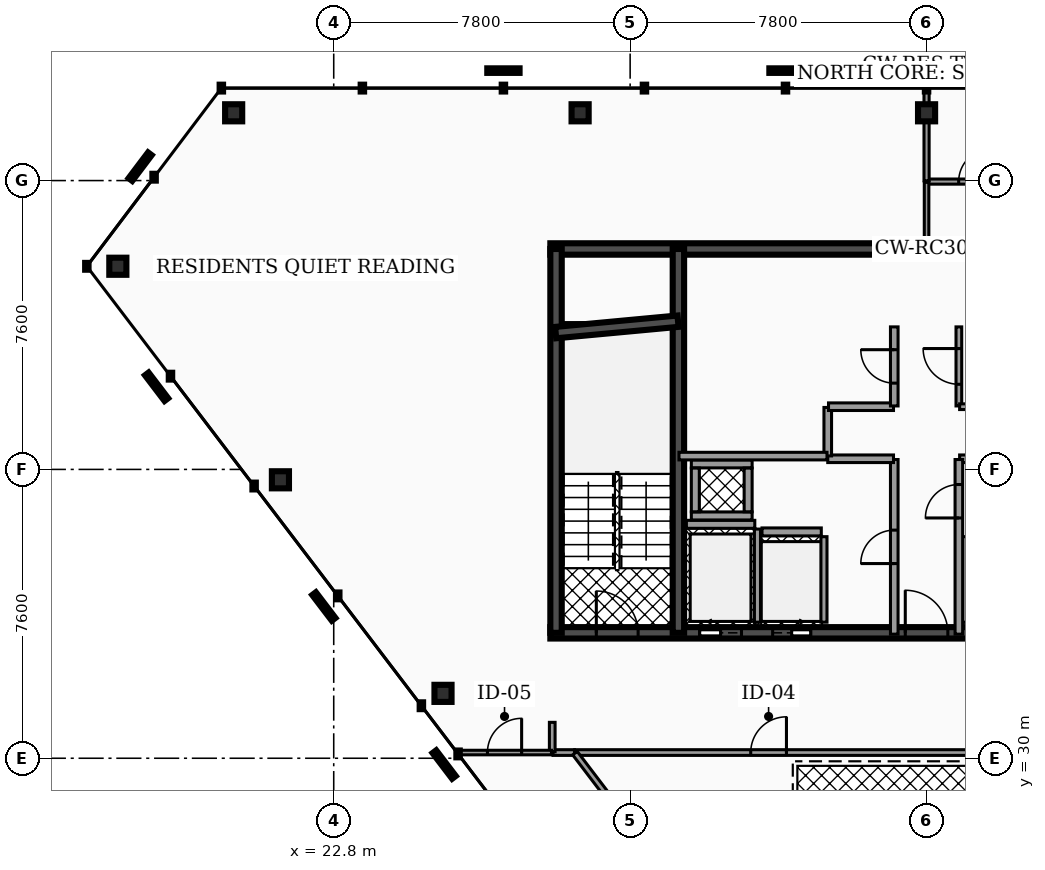
"""IFC4 building model, lengths in metres.
Left out: names, types, materials, properties, quantities, classifications, styles, units other than length and angle.
Written with IfcOpenShell. Run it as: python <this file> out.ifc"""

import sys

from ifc_helpers import new_model, si_unit, direction, frame, frame_2d, origin, origin_2d, place, context, subcontext, project, spatial, rectangle, hollow_rectangle, extrude, element, fill, save


model = new_model("IFC4")
c1 = context("Model", 3, precision=1e-05, world=origin(), true_north=direction((0.0, 1.0)))
c2 = subcontext(c1, "Body", "Model", "MODEL_VIEW")
j1 = project(units=[si_unit("LENGTHUNIT", "METRE"), si_unit("PLANEANGLEUNIT", "RADIAN")], contexts=[c1])
p1 = place(None, origin())
s1 = spatial("IfcSite", under=j1, at=p1, CompositionType="ELEMENT")
p2 = place(p1, origin())
s2 = spatial("IfcBuilding", under=s1, at=p2, CompositionType="ELEMENT")
p3 = place(p2, frame((0.0, 0.0, 285.6)))
s3 = spatial("IfcBuildingStorey", under=s2, at=p3, CompositionType="ELEMENT", Elevation=285.6)
p4 = place(p3, frame((28.5, 43.4, 0.0), z_axis=(0.0, 0.0, 1.0), x_axis=(1.0, 0.0, 0.0)))
e1 = element("IfcWall", 1, at=p4, inside=s3, PredefinedType="SHEAR", context=c2, shape_type="SweptSolid", body=[
    extrude(rectangle(XDim=19.86, YDim=0.3, at=frame_2d((9.93, 0.0))), origin(), (0.0, 0.0, 1.0), 3.18),
])
p5 = place(p3, frame((28.5, 33.3, 0.0), z_axis=(0.0, 0.0, 1.0), x_axis=(1.0, 0.0, 0.0)))
e2 = element("IfcWall", 2, at=p5, inside=s3, PredefinedType="SHEAR", context=c2, shape_type="SweptSolid", body=[
    extrude(rectangle(XDim=19.86, YDim=0.3, at=frame_2d((9.93, 0.0))), origin(), (0.0, 0.0, 1.0), 3.18),
])
p6 = place(p5, frame((3.93, 0.0, 0.0)))
e3 = element("IfcOpeningElement", 3, at=p6, cuts=e2, PredefinedType="OPENING", context=c2, shape_type="SweptSolid", body=[
    extrude(rectangle(XDim=1.1, YDim=2.15, at=frame_2d((0.55, 1.075))), frame((0.0, 0.16, 0.0), z_axis=(0.0, -1.0, 0.0), x_axis=(1.0, 0.0, 0.0)), (0.0, 0.0, 1.0), 0.32),
])
p7 = place(p5, frame((14.77, 0.0, 0.0)))
e4 = element("IfcOpeningElement", 4, at=p7, cuts=e2, PredefinedType="OPENING", context=c2, shape_type="SweptSolid", body=[
    extrude(rectangle(XDim=1.1, YDim=2.15, at=frame_2d((0.55, 1.075))), frame((0.0, 0.16, 0.0), z_axis=(0.0, -1.0, 0.0), x_axis=(1.0, 0.0, 0.0)), (0.0, 0.0, 1.0), 0.32),
])
p8 = place(p5, frame((11.25, 0.0, 0.0)))
e5 = element("IfcOpeningElement", 5, at=p8, cuts=e2, PredefinedType="OPENING", context=c2, shape_type="SweptSolid", body=[
    extrude(rectangle(XDim=1.0, YDim=2.1, at=frame_2d((0.5, 1.05))), frame((0.0, 0.16, 0.0), z_axis=(0.0, -1.0, 0.0), x_axis=(1.0, 0.0, 0.0)), (0.0, 0.0, 1.0), 0.32),
])
p9 = place(p5, frame((12.95, 0.0, 0.0)))
e6 = element("IfcOpeningElement", 6, at=p9, cuts=e2, PredefinedType="OPENING", context=c2, shape_type="SweptSolid", body=[
    extrude(rectangle(XDim=1.0, YDim=2.1, at=frame_2d((0.5, 1.05))), frame((0.0, 0.16, 0.0), z_axis=(0.0, -1.0, 0.0), x_axis=(1.0, 0.0, 0.0)), (0.0, 0.0, 1.0), 0.32),
])
p10 = place(p5, frame((5.85, 0.0, 0.0)))
e7 = element("IfcOpeningElement", 7, at=p10, cuts=e2, PredefinedType="OPENING", context=c2, shape_type="SweptSolid", body=[
    extrude(rectangle(XDim=1.0, YDim=2.1, at=frame_2d((0.5, 1.05))), frame((0.0, 0.16, 0.0), z_axis=(0.0, -1.0, 0.0), x_axis=(1.0, 0.0, 0.0)), (0.0, 0.0, 1.0), 0.32),
])
p11 = place(p5, frame((1.21, 0.0, 0.0)))
e8 = element("IfcOpeningElement", 8, at=p11, cuts=e2, PredefinedType="OPENING", context=c2, shape_type="SweptSolid", body=[
    extrude(rectangle(XDim=1.1, YDim=2.2, at=frame_2d((0.55, 1.1))), frame((0.0, 0.16, 0.0), z_axis=(0.0, -1.0, 0.0), x_axis=(1.0, 0.0, 0.0)), (0.0, 0.0, 1.0), 0.32),
])
p12 = place(p5, frame((9.34, 0.0, 0.0)))
e9 = element("IfcOpeningElement", 9, at=p12, cuts=e2, PredefinedType="OPENING", context=c2, shape_type="SweptSolid", body=[
    extrude(rectangle(XDim=1.12, YDim=2.05, at=frame_2d((0.56, 1.025))), frame((0.0, 0.16, 0.0), z_axis=(0.0, -1.0, 0.0), x_axis=(1.0, 0.0, 0.0)), (0.0, 0.0, 1.0), 0.32),
])
p13 = place(p5, frame((17.55, 0.0, 0.0)))
e10 = element("IfcOpeningElement", 10, at=p13, cuts=e2, PredefinedType="OPENING", context=c2, shape_type="SweptSolid", body=[
    extrude(rectangle(XDim=1.1, YDim=2.2, at=frame_2d((0.55, 1.1))), frame((0.0, 0.16, 0.0), z_axis=(0.0, -1.0, 0.0), x_axis=(1.0, 0.0, 0.0)), (0.0, 0.0, 1.0), 0.32),
])
for number, where, z_axis, x_axis in (
    (11, (28.65, 33.3, 0.0), (0.0, 0.0, 1.0), (0.0, 1.0, 0.0)),
    (12, (31.87, 33.3, 0.0), (0.0, 0.0, 1.0), (0.0, 1.0, 0.0)),
):
    element("IfcWall", number, at=place(p3, frame(where, z_axis=z_axis, x_axis=x_axis)), inside=s3, PredefinedType="SHEAR", context=c2, shape_type="SweptSolid", body=[
        extrude(rectangle(XDim=10.1, YDim=0.3, at=frame_2d((5.05, 0.0))), origin(), (0.0, 0.0, 1.0), 3.18),
    ])
p14 = place(p3, frame((28.64, 41.2, 0.0), z_axis=(0.0, 0.0, 1.0), x_axis=(0.995687118776, 0.092774789157, 0.0)))
e13 = element("IfcWall", 13, at=p14, inside=s3, PredefinedType="SHEAR", context=c2, shape_type="SweptSolid", body=[
    extrude(rectangle(XDim=3.234, YDim=0.3, at=frame_2d((1.617, 0.0))), origin(), (0.0, 0.0, 1.0), 3.18),
])
p15 = place(p3, frame((38.4, 46.983, 0.0), z_axis=(-0.04858543316, -0.036630657808, 0.998147108693), x_axis=(0.602013203522, -0.798486131868, 0.0)))
e14 = element("IfcColumn", 14, at=p15, inside=s3, PredefinedType="COLUMN", context=c2, shape_type="SweptSolid", body=[
    extrude(hollow_rectangle(XDim=0.45, YDim=0.45, WallThickness=0.022, at=origin_2d()), origin(), (0.0, 0.0, 1.0), 3.186),
])
p16 = place(p3, frame((29.283, 46.983, 0.0), z_axis=(-0.041777954794, -0.036641949343, 0.998454791186), x_axis=(0.659383108358, -0.751807100533, 0.0)))
e15 = element("IfcColumn", 15, at=p16, inside=s3, PredefinedType="COLUMN", context=c2, shape_type="SweptSolid", body=[
    extrude(hollow_rectangle(XDim=0.45, YDim=0.45, WallThickness=0.022, at=origin_2d()), origin(), (0.0, 0.0, 1.0), 3.185),
])
p17 = place(p3, frame((20.167, 46.983, 0.0), z_axis=(-0.035041235995, -0.036651445964, 0.998713564186), x_axis=(0.722806038256, -0.691050961262, 0.0)))
e16 = element("IfcColumn", 16, at=p17, inside=s3, PredefinedType="COLUMN", context=c2, shape_type="SweptSolid", body=[
    extrude(hollow_rectangle(XDim=0.45, YDim=0.45, WallThickness=0.022, at=origin_2d()), origin(), (0.0, 0.0, 1.0), 3.184),
])
p18 = place(p3, frame((17.119, 42.946, 0.0), z_axis=(0.075351363704, 0.107318608912, 0.991365163887), x_axis=(-0.818413024526, 0.574630421476, 0.0)))
e17 = element("IfcColumn", 17, at=p18, inside=s3, PredefinedType="COLUMN", context=c2, shape_type="SweptSolid", body=[
    extrude(hollow_rectangle(XDim=0.45, YDim=0.45, WallThickness=0.022, at=origin_2d()), origin(), (0.0, 0.0, 1.0), 3.208),
])
p19 = place(p3, frame((21.397, 37.327, 0.0), z_axis=(0.072941050264, 0.115078007351, 0.99067484848), x_axis=(-0.844625560126, 0.53535750969, 0.0)))
e18 = element("IfcColumn", 18, at=p19, inside=s3, PredefinedType="COLUMN", context=c2, shape_type="SweptSolid", body=[
    extrude(hollow_rectangle(XDim=0.45, YDim=0.45, WallThickness=0.022, at=origin_2d()), origin(), (0.0, 0.0, 1.0), 3.21),
])
p20 = place(p3, frame((25.676, 31.708, 0.0), z_axis=(0.070528752812, 0.122893311743, 0.98991056614), x_axis=(-0.867317421321, 0.497755452681, 0.0)))
e19 = element("IfcColumn", 19, at=p20, inside=s3, PredefinedType="COLUMN", context=c2, shape_type="SweptSolid", body=[
    extrude(hollow_rectangle(XDim=0.45, YDim=0.45, WallThickness=0.022, at=origin_2d()), origin(), (0.0, 0.0, 1.0), 3.212),
])
p21 = place(p3, frame((32.08, 36.155, 0.0), z_axis=(0.0, 0.0, 1.0), x_axis=(1.0, 0.0, 0.0)))
e20 = element("IfcWall", 20, at=p21, inside=s3, PredefinedType="SOLIDWALL", context=c2, shape_type="SweptSolid", body=[
    extrude(rectangle(XDim=1.8, YDim=0.21, at=frame_2d((0.9, 0.0))), origin(), (0.0, 0.0, 1.0), 3.18),
])
p22 = place(p3, frame((33.95, 33.58, 0.0), z_axis=(0.0, 0.0, 1.0), x_axis=(0.0, 1.0, 0.0)))
e21 = element("IfcWall", 21, at=p22, inside=s3, PredefinedType="SOLIDWALL", context=c2, shape_type="SweptSolid", body=[
    extrude(rectangle(XDim=2.45, YDim=0.16, at=frame_2d((1.225, 0.0))), origin(), (0.0, 0.0, 1.0), 3.18),
])
p23 = place(p3, frame((39.4, 33.58, 0.0), z_axis=(0.0, 0.0, 1.0), x_axis=(0.0, 1.0, 0.0)))
e22 = element("IfcWall", 22, at=p23, inside=s3, PredefinedType="SOLIDWALL", context=c2, shape_type="SweptSolid", body=[
    extrude(rectangle(XDim=2.25, YDim=0.16, at=frame_2d((1.125, 0.0))), origin(), (0.0, 0.0, 1.0), 3.18),
])
p24 = place(p3, frame((34.07, 35.955, 0.0), z_axis=(0.0, 0.0, 1.0), x_axis=(1.0, 0.0, 0.0)))
e23 = element("IfcWall", 23, at=p24, inside=s3, PredefinedType="SOLIDWALL", context=c2, shape_type="SweptSolid", body=[
    extrude(rectangle(XDim=1.56, YDim=0.21, at=frame_2d((0.78, 0.0))), origin(), (0.0, 0.0, 1.0), 3.18),
])
p25 = place(p3, frame((35.7, 33.58, 0.0), z_axis=(0.0, 0.0, 1.0), x_axis=(0.0, 1.0, 0.0)))
e24 = element("IfcWall", 24, at=p25, inside=s3, PredefinedType="SOLIDWALL", context=c2, shape_type="SweptSolid", body=[
    extrude(rectangle(XDim=2.25, YDim=0.16, at=frame_2d((1.125, 0.0))), origin(), (0.0, 0.0, 1.0), 3.18),
])
for number, where, z_axis, x_axis in (
    (25, (32.21, 36.375, 0.0), (0.0, 0.0, 1.0), (1.0, 0.0, 0.0)),
    (26, (32.21, 37.745, 0.0), (0.0, 0.0, 1.0), (1.0, 0.0, 0.0)),
):
    element("IfcWall", number, at=place(p3, frame(where, z_axis=z_axis, x_axis=x_axis)), inside=s3, PredefinedType="SOLIDWALL", context=c2, shape_type="SweptSolid", body=[
        extrude(rectangle(XDim=1.6, YDim=0.21, at=frame_2d((0.8, 0.0))), origin(), (0.0, 0.0, 1.0), 3.18),
    ])
for number, where, z_axis, x_axis in (
    (27, (32.315, 36.485, 0.0), (0.0, 0.0, 1.0), (0.0, 1.0, 0.0)),
    (28, (33.705, 36.485, 0.0), (0.0, 0.0, 1.0), (0.0, 1.0, 0.0)),
):
    element("IfcWall", number, at=place(p3, frame(where, z_axis=z_axis, x_axis=x_axis)), inside=s3, PredefinedType="SOLIDWALL", context=c2, shape_type="SweptSolid", body=[
        extrude(rectangle(XDim=1.15, YDim=0.21, at=frame_2d((0.575, 0.0))), origin(), (0.0, 0.0, 1.0), 3.18),
    ])
p26 = place(p3, frame((37.55, 33.265, 0.0), z_axis=(0.0, 0.0, 1.0), x_axis=(0.0, 1.0, 0.0)))
e29 = element("IfcWall", 29, at=p26, inside=s3, PredefinedType="PARTITIONING", context=c2, shape_type="SweptSolid", body=[
    extrude(rectangle(XDim=4.595, YDim=0.2, at=frame_2d((2.298, 0.0))), origin(), (0.0, 0.0, 1.0), 2.235),
])
p27 = place(p26, frame((1.857, 0.0, 0.0)))
e30 = element("IfcOpeningElement", 30, at=p27, cuts=e29, PredefinedType="OPENING", context=c2, shape_type="SweptSolid", body=[
    extrude(rectangle(XDim=0.88, YDim=2.05, at=frame_2d((0.44, 1.025))), frame((0.0, 0.11, 0.0), z_axis=(0.0, -1.0, 0.0), x_axis=(1.0, 0.0, 0.0)), (0.0, 0.0, 1.0), 0.22),
])
p28 = place(p3, frame((35.8, 37.88, 0.0), z_axis=(0.0, 0.0, 1.0), x_axis=(1.0, 0.0, 0.0)))
e31 = element("IfcWall", 31, at=p28, inside=s3, PredefinedType="PARTITIONING", context=c2, shape_type="SweptSolid", body=[
    extrude(rectangle(XDim=1.73, YDim=0.2, at=frame_2d((0.865, 0.0))), origin(), (0.0, 0.0, 1.0), 2.235),
])
p29 = place(p3, frame((35.8, 37.955, 0.0), z_axis=(0.0, 0.0, 1.0), x_axis=(0.0, 1.0, 0.0)))
e32 = element("IfcWall", 32, at=p29, inside=s3, PredefinedType="PARTITIONING", context=c2, shape_type="SweptSolid", body=[
    extrude(rectangle(XDim=1.275, YDim=0.2, at=frame_2d((0.637, 0.0))), origin(), (0.0, 0.0, 1.0), 2.235),
])
p30 = place(p3, frame((35.82, 39.25, 0.0), z_axis=(0.0, 0.0, 1.0), x_axis=(1.0, 0.0, 0.0)))
e33 = element("IfcWall", 33, at=p30, inside=s3, PredefinedType="PARTITIONING", context=c2, shape_type="SweptSolid", body=[
    extrude(rectangle(XDim=1.71, YDim=0.2, at=frame_2d((0.855, 0.0))), origin(), (0.0, 0.0, 1.0), 2.235),
])
p31 = place(p3, frame((37.55, 39.27, 0.0), z_axis=(0.0, 0.0, 1.0), x_axis=(0.0, 1.0, 0.0)))
e34 = element("IfcWall", 34, at=p31, inside=s3, PredefinedType="PARTITIONING", context=c2, shape_type="SweptSolid", body=[
    extrude(rectangle(XDim=2.08, YDim=0.2, at=frame_2d((1.04, 0.0))), origin(), (0.0, 0.0, 1.0), 2.235),
])
p32 = place(p31, frame((0.6, 0.0, 0.0)))
e35 = element("IfcOpeningElement", 35, at=p32, cuts=e34, PredefinedType="OPENING", context=c2, shape_type="SweptSolid", body=[
    extrude(rectangle(XDim=0.88, YDim=2.05, at=frame_2d((0.44, 1.025))), frame((0.0, 0.11, 0.0), z_axis=(0.0, -1.0, 0.0), x_axis=(1.0, 0.0, 0.0)), (0.0, 0.0, 1.0), 0.22),
])
p33 = place(p3, frame((39.27, 37.88, 0.0), z_axis=(0.0, 0.0, 1.0), x_axis=(1.0, 0.0, 0.0)))
e36 = element("IfcWall", 36, at=p33, inside=s3, PredefinedType="PARTITIONING", context=c2, shape_type="SweptSolid", body=[
    extrude(rectangle(XDim=1.93, YDim=0.2, at=frame_2d((0.965, 0.0))), origin(), (0.0, 0.0, 1.0), 2.235),
])
p34 = place(p3, frame((39.25, 33.265, 0.0), z_axis=(0.0, 0.0, 1.0), x_axis=(0.0, 1.0, 0.0)))
e37 = element("IfcWall", 37, at=p34, inside=s3, PredefinedType="PARTITIONING", context=c2, shape_type="SweptSolid", body=[
    extrude(rectangle(XDim=4.595, YDim=0.2, at=frame_2d((2.298, 0.0))), origin(), (0.0, 0.0, 1.0), 2.235),
])
p35 = place(p34, frame((3.058, 0.0, 0.0)))
e38 = element("IfcOpeningElement", 38, at=p35, cuts=e37, PredefinedType="OPENING", context=c2, shape_type="SweptSolid", body=[
    extrude(rectangle(XDim=0.88, YDim=2.05, at=frame_2d((0.44, 1.025))), frame((0.0, 0.11, 0.0), z_axis=(0.0, -1.0, 0.0), x_axis=(1.0, 0.0, 0.0)), (0.0, 0.0, 1.0), 0.22),
])
p36 = place(p3, frame((39.25, 39.27, 0.0), z_axis=(0.0, 0.0, 1.0), x_axis=(0.0, 1.0, 0.0)))
e39 = element("IfcWall", 39, at=p36, inside=s3, PredefinedType="PARTITIONING", context=c2, shape_type="SweptSolid", body=[
    extrude(rectangle(XDim=2.08, YDim=0.15, at=frame_2d((1.04, 0.0))), origin(), (0.0, 0.0, 1.0), 2.235),
])
p37 = place(p36, frame((0.57, 0.0, 0.0)))
e40 = element("IfcOpeningElement", 40, at=p37, cuts=e39, PredefinedType="OPENING", context=c2, shape_type="SweptSolid", body=[
    extrude(rectangle(XDim=0.94, YDim=2.05, at=frame_2d((0.47, 1.025))), frame((0.0, 0.085, 0.0), z_axis=(0.0, -1.0, 0.0), x_axis=(1.0, 0.0, 0.0)), (0.0, 0.0, 1.0), 0.17),
])
p38 = place(p3, frame((39.27, 39.25, 0.0), z_axis=(0.0, 0.0, 1.0), x_axis=(1.0, 0.0, 0.0)))
e41 = element("IfcWall", 41, at=p38, inside=s3, PredefinedType="PARTITIONING", context=c2, shape_type="SweptSolid", body=[
    extrude(rectangle(XDim=1.91, YDim=0.15, at=frame_2d((0.955, 0.0))), origin(), (0.0, 0.0, 1.0), 2.235),
])
p39 = place(p3, frame((31.885, 37.95, 0.0), z_axis=(0.0, 0.0, 1.0), x_axis=(1.0, 0.0, 0.0)))
e42 = element("IfcWall", 42, at=p39, inside=s3, PredefinedType="PARTITIONING", context=c2, shape_type="SweptSolid", body=[
    extrude(rectangle(XDim=3.895, YDim=0.2, at=frame_2d((1.948, 0.0))), origin(), (0.0, 0.0, 1.0), 2.235),
])
p40 = place(p3, frame((29.141, 30.15, 0.0), z_axis=(0.0, 0.0, 1.0), x_axis=(1.0, 0.0, 0.0)))
e43 = element("IfcWall", 43, at=p40, inside=s3, PredefinedType="PARTITIONING", context=c2, shape_type="SweptSolid", body=[
    extrude(rectangle(XDim=16.204, YDim=0.15, at=frame_2d((8.102, 0.0))), origin(), (0.0, 0.0, 1.0), 2.235),
])
p41 = place(p40, frame((4.632, 0.0, 0.0)))
e44 = element("IfcOpeningElement", 44, at=p41, cuts=e43, PredefinedType="OPENING", context=c2, shape_type="SweptSolid", body=[
    extrude(rectangle(XDim=0.94, YDim=2.05, at=frame_2d((0.47, 1.025))), frame((0.0, 0.085, 0.0), z_axis=(0.0, -1.0, 0.0), x_axis=(1.0, 0.0, 0.0)), (0.0, 0.0, 1.0), 0.17),
])
p42 = place(p3, frame((28.57, 30.15, 0.0), z_axis=(0.0, 0.0, 1.0), x_axis=(1.0, 0.0, 0.0)))
e45 = element("IfcWall", 45, at=p42, inside=s3, PredefinedType="PARTITIONING", context=c2, shape_type="SweptSolid", body=[
    extrude(rectangle(XDim=0.565, YDim=0.15, at=frame_2d((0.282, 0.0))), origin(), (0.0, 0.0, 1.0), 2.235),
])
p43 = place(p3, frame((28.55, 30.17, 0.0), z_axis=(0.0, 0.0, 1.0), x_axis=(0.0, 1.0, 0.0)))
e46 = element("IfcWall", 46, at=p43, inside=s3, PredefinedType="PARTITIONING", context=c2, shape_type="SweptSolid", body=[
    extrude(rectangle(XDim=0.775, YDim=0.15, at=frame_2d((0.387, 0.0))), origin(), (0.0, 0.0, 1.0), 2.235),
])
p44 = place(p3, frame((29.148, 30.134, 0.0), z_axis=(0.0, 0.0, 1.0), x_axis=(0.605873710815, -0.795560837739, 0.0)))
e47 = element("IfcWall", 47, at=p44, inside=s3, PredefinedType="PARTITIONING", context=c2, shape_type="SweptSolid", body=[
    extrude(rectangle(XDim=2.474, YDim=0.15, at=frame_2d((1.237, 0.0))), origin(), (0.0, 0.0, 1.0), 2.235),
])
p45 = place(p3, frame((26.059, 30.15, 0.0), z_axis=(0.0, 0.0, 1.0), x_axis=(1.0, 0.0, 0.0)))
e48 = element("IfcWall", 48, at=p45, inside=s3, PredefinedType="PARTITIONING", context=c2, shape_type="SweptSolid", body=[
    extrude(rectangle(XDim=2.471, YDim=0.12, at=frame_2d((1.235, 0.0))), origin(), (0.0, 0.0, 1.0), 2.235),
])
p46 = place(p45, frame((0.785, 0.0, 0.0)))
e49 = element("IfcOpeningElement", 49, at=p46, cuts=e48, PredefinedType="OPENING", context=c2, shape_type="SweptSolid", body=[
    extrude(rectangle(XDim=0.9, YDim=2.05, at=frame_2d((0.45, 1.025))), frame((0.0, 0.07, 0.0), z_axis=(0.0, -1.0, 0.0), x_axis=(1.0, 0.0, 0.0)), (0.0, 0.0, 1.0), 0.14),
])
p47 = place(p3, frame((38.42, 45.173, 0.0), z_axis=(0.0, 0.0, 1.0), x_axis=(1.0, 0.0, 0.0)))
e50 = element("IfcWall", 50, at=p47, inside=s3, PredefinedType="PARTITIONING", context=c2, shape_type="SweptSolid", body=[
    extrude(rectangle(XDim=2.51, YDim=0.135, at=frame_2d((1.255, 0.0))), origin(), (0.0, 0.0, 1.0), 2.235),
])
p48 = place(p47, frame((0.825, 0.0, 0.0)))
e51 = element("IfcOpeningElement", 51, at=p48, cuts=e50, PredefinedType="OPENING", context=c2, shape_type="SweptSolid", body=[
    extrude(rectangle(XDim=0.86, YDim=2.05, at=frame_2d((0.43, 1.025))), frame((0.0, 0.077, 0.0), z_axis=(0.0, -1.0, 0.0), x_axis=(1.0, 0.0, 0.0)), (0.0, 0.0, 1.0), 0.155),
])
p49 = place(p3, frame((38.4, 43.415, 0.0), z_axis=(0.0, 0.0, 1.0), x_axis=(0.0, 1.0, 0.0)))
e52 = element("IfcWall", 52, at=p49, inside=s3, PredefinedType="PARTITIONING", context=c2, shape_type="SweptSolid", body=[
    extrude(rectangle(XDim=1.738, YDim=0.12, at=frame_2d((0.869, 0.0))), origin(), (0.0, 0.0, 1.0), 2.235),
])
p50 = place(p3, frame((38.4, 45.193, 0.0), z_axis=(0.0, 0.0, 1.0), x_axis=(0.0, 1.0, 0.0)))
e53 = element("IfcWall", 53, at=p50, inside=s3, PredefinedType="PARTITIONING", context=c2, shape_type="SweptSolid", body=[
    extrude(rectangle(XDim=2.425, YDim=0.135, at=frame_2d((1.212, 0.0))), origin(), (0.0, 0.0, 1.0), 2.235),
])
p51 = place(p6, origin())
e54 = element("IfcDoor", 54, at=p51, inside=s3, OperationType="SLIDING_TO_LEFT", PredefinedType="DOOR", context=c2, shape_type="SweptSolid", body=[
    extrude(rectangle(XDim=1.1, YDim=2.15, at=frame_2d((0.55, 1.075))), frame((0.0, 0.025, 0.0), z_axis=(0.0, -1.0, 0.0), x_axis=(1.0, 0.0, 0.0)), (0.0, 0.0, 1.0), 0.05),
])
fill(e3, e54)
p52 = place(p10, origin())
e55 = element("IfcDoor", 55, at=p52, inside=s3, OperationType="SLIDING_TO_RIGHT", PredefinedType="DOOR", context=c2, shape_type="SweptSolid", body=[
    extrude(rectangle(XDim=1.0, YDim=2.1, at=frame_2d((0.5, 1.05))), frame((0.0, 0.025, 0.0), z_axis=(0.0, -1.0, 0.0), x_axis=(1.0, 0.0, 0.0)), (0.0, 0.0, 1.0), 0.05),
])
fill(e7, e55)
p53 = place(p11, origin())
e56 = element("IfcDoor", 56, at=p53, inside=s3, OperationType="SINGLE_SWING_LEFT", PredefinedType="DOOR", context=c2, shape_type="SweptSolid", body=[
    extrude(rectangle(XDim=1.1, YDim=2.2, at=frame_2d((0.55, 1.1))), frame((0.0, 0.025, 0.0), z_axis=(0.0, -1.0, 0.0), x_axis=(1.0, 0.0, 0.0)), (0.0, 0.0, 1.0), 0.05),
])
fill(e8, e56)
p54 = place(p12, origin())
e57 = element("IfcDoor", 57, at=p54, inside=s3, OperationType="SINGLE_SWING_LEFT", PredefinedType="DOOR", context=c2, shape_type="SweptSolid", body=[
    extrude(rectangle(XDim=1.12, YDim=2.05, at=frame_2d((0.56, 1.025))), frame((0.0, 0.025, 0.0), z_axis=(0.0, -1.0, 0.0), x_axis=(1.0, 0.0, 0.0)), (0.0, 0.0, 1.0), 0.05),
])
fill(e9, e57)
p55 = place(p27, origin())
e58 = element("IfcDoor", 58, at=p55, inside=s3, OperationType="SINGLE_SWING_LEFT", PredefinedType="DOOR", context=c2, shape_type="SweptSolid", body=[
    extrude(rectangle(XDim=0.88, YDim=2.05, at=frame_2d((0.44, 1.025))), frame((0.0, 0.025, 0.0), z_axis=(0.0, -1.0, 0.0), x_axis=(1.0, 0.0, 0.0)), (0.0, 0.0, 1.0), 0.05),
])
fill(e30, e58)
p56 = place(p32, origin())
e59 = element("IfcDoor", 59, at=p56, inside=s3, OperationType="SINGLE_SWING_RIGHT", PredefinedType="DOOR", context=c2, shape_type="SweptSolid", body=[
    extrude(rectangle(XDim=0.88, YDim=2.05, at=frame_2d((0.44, 1.025))), frame((0.0, 0.025, 0.0), z_axis=(0.0, -1.0, 0.0), x_axis=(1.0, 0.0, 0.0)), (0.0, 0.0, 1.0), 0.05),
])
fill(e35, e59)
p57 = place(p35, origin())
e60 = element("IfcDoor", 60, at=p57, inside=s3, OperationType="SINGLE_SWING_LEFT", PredefinedType="DOOR", context=c2, shape_type="SweptSolid", body=[
    extrude(rectangle(XDim=0.88, YDim=2.05, at=frame_2d((0.44, 1.025))), frame((0.0, 0.025, 0.0), z_axis=(0.0, -1.0, 0.0), x_axis=(1.0, 0.0, 0.0)), (0.0, 0.0, 1.0), 0.05),
])
fill(e38, e60)
p58 = place(p37, origin())
e61 = element("IfcDoor", 61, at=p58, inside=s3, OperationType="SINGLE_SWING_RIGHT", PredefinedType="DOOR", context=c2, shape_type="SweptSolid", body=[
    extrude(rectangle(XDim=0.94, YDim=2.05, at=frame_2d((0.47, 1.025))), frame((0.0, 0.025, 0.0), z_axis=(0.0, -1.0, 0.0), x_axis=(1.0, 0.0, 0.0)), (0.0, 0.0, 1.0), 0.05),
])
fill(e40, e61)
p59 = place(p41, origin())
e62 = element("IfcDoor", 62, at=p59, inside=s3, OperationType="SINGLE_SWING_RIGHT", PredefinedType="DOOR", context=c2, shape_type="SweptSolid", body=[
    extrude(rectangle(XDim=0.94, YDim=2.05, at=frame_2d((0.47, 1.025))), frame((0.0, 0.025, 0.0), z_axis=(0.0, -1.0, 0.0), x_axis=(1.0, 0.0, 0.0)), (0.0, 0.0, 1.0), 0.05),
])
fill(e44, e62)
p60 = place(p46, origin())
e63 = element("IfcDoor", 63, at=p60, inside=s3, OperationType="SINGLE_SWING_RIGHT", PredefinedType="DOOR", context=c2, shape_type="SweptSolid", body=[
    extrude(rectangle(XDim=0.9, YDim=2.05, at=frame_2d((0.45, 1.025))), frame((0.0, 0.025, 0.0), z_axis=(0.0, -1.0, 0.0), x_axis=(1.0, 0.0, 0.0)), (0.0, 0.0, 1.0), 0.05),
])
fill(e49, e63)
p61 = place(p48, origin())
e64 = element("IfcDoor", 64, at=p61, inside=s3, OperationType="SINGLE_SWING_RIGHT", PredefinedType="DOOR", context=c2, shape_type="SweptSolid", body=[
    extrude(rectangle(XDim=0.86, YDim=2.05, at=frame_2d((0.43, 1.025))), frame((0.0, 0.025, 0.0), z_axis=(0.0, -1.0, 0.0), x_axis=(1.0, 0.0, 0.0)), (0.0, 0.0, 1.0), 0.05),
])
fill(e51, e64)
save(model, sys.argv[1])
